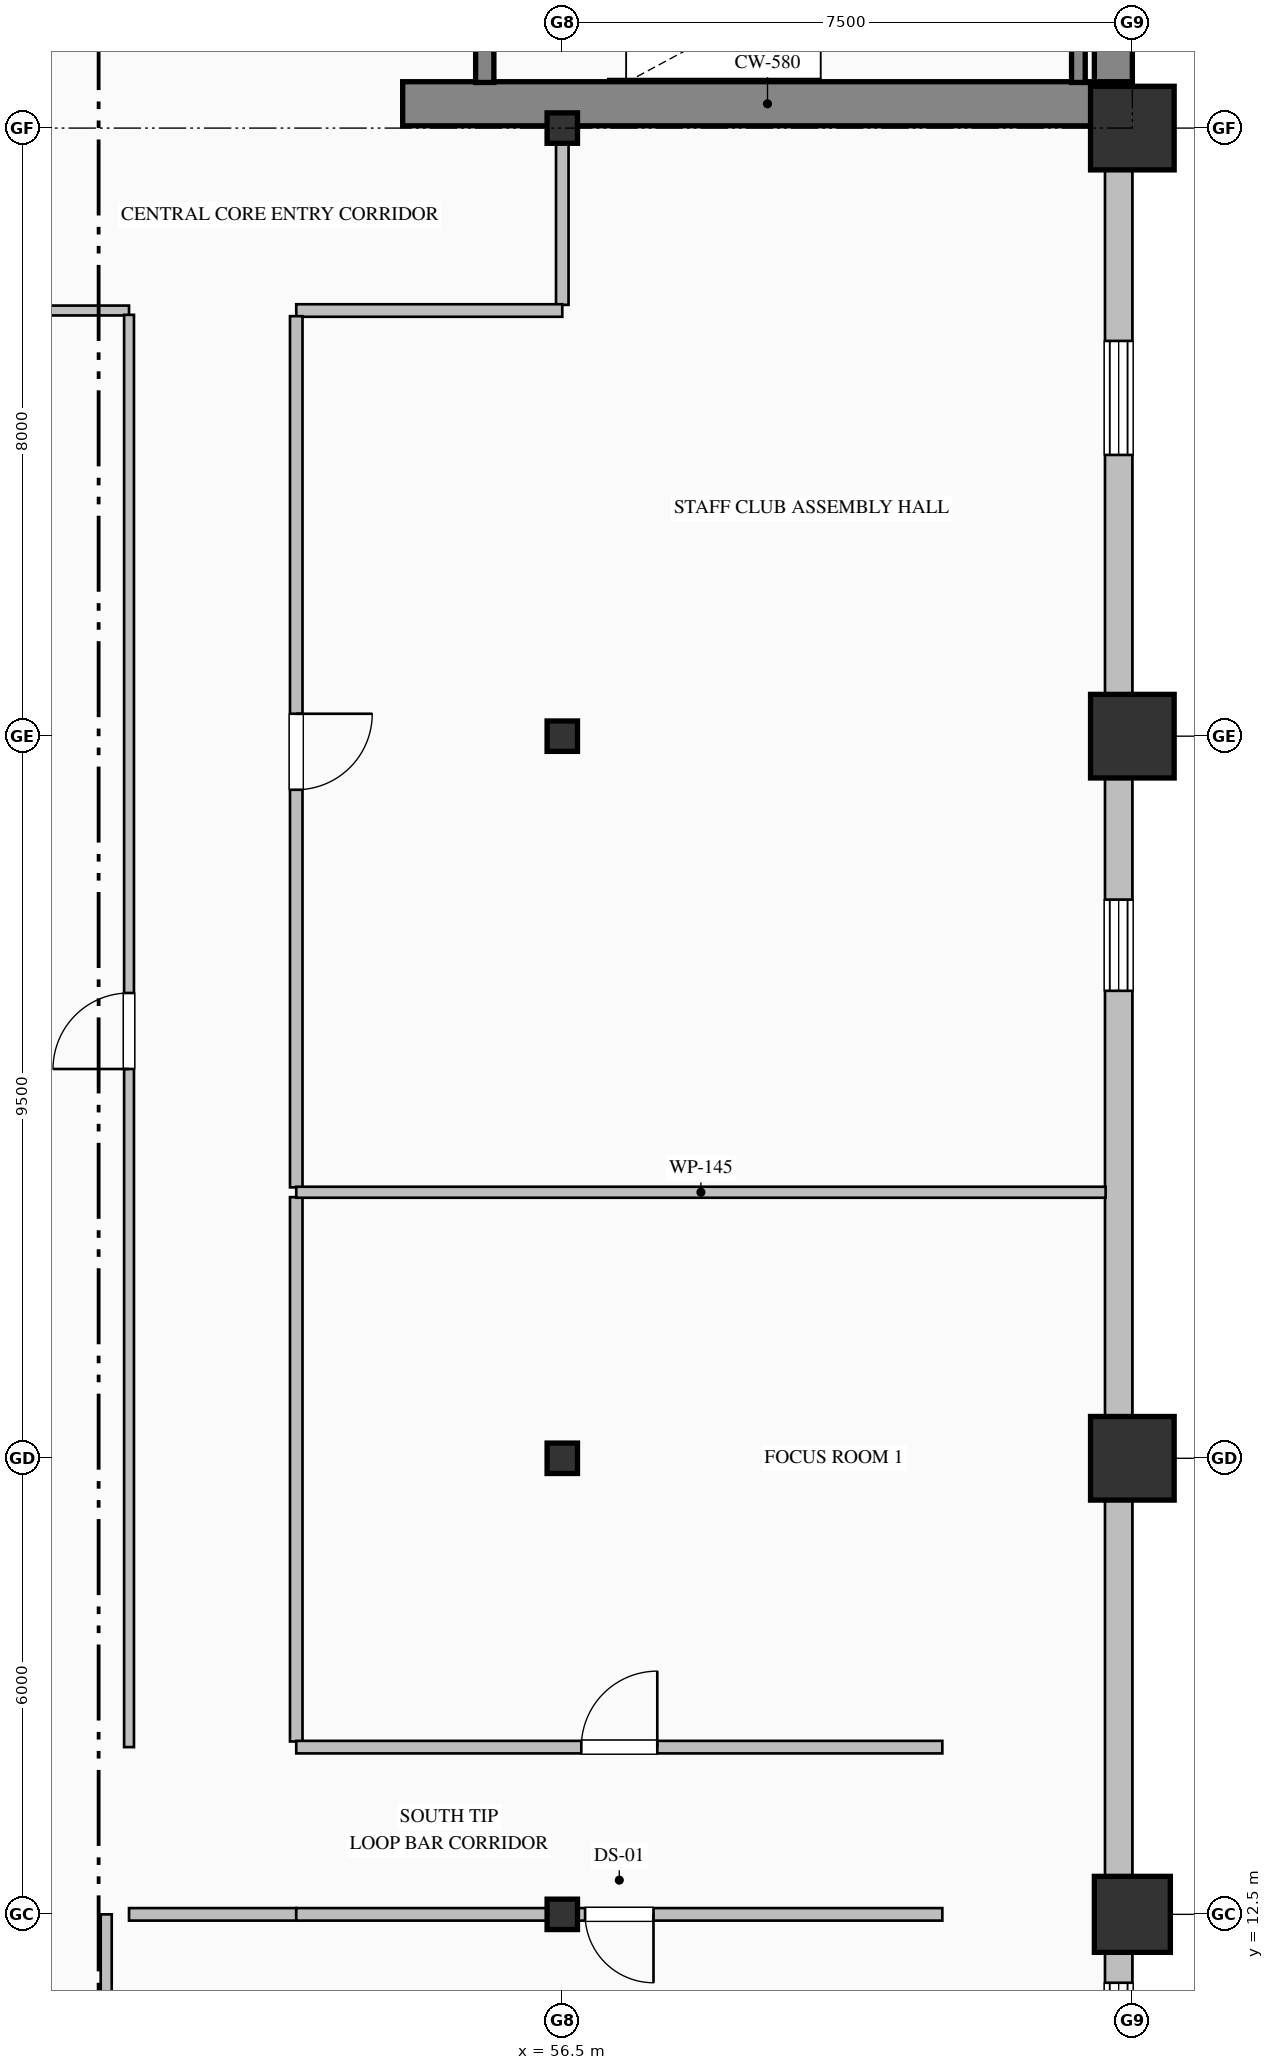
"""IFC4 building model, lengths in metres.
Left out: names, types, materials, properties, quantities, classifications, styles, units other than length and angle.
Written with IfcOpenShell. Run it as: python <this file> out.ifc"""

import sys

from ifc_helpers import new_model, si_unit, direction, frame, frame_2d, origin, origin_2d, place, context, subcontext, project, spatial, rectangle, hollow_rectangle, hollow_circle, i_section, extrude, element, fill, save


model = new_model("IFC4")
c1 = context("Model", 3, precision=1e-05, world=origin(), true_north=direction((0.0, 1.0)))
c2 = subcontext(c1, "Body", "Model", "MODEL_VIEW")
j1 = project(units=[si_unit("LENGTHUNIT", "METRE"), si_unit("PLANEANGLEUNIT", "RADIAN")], contexts=[c1])
p1 = place(None, origin())
s1 = spatial("IfcSite", under=j1, at=p1, CompositionType="ELEMENT")
p2 = place(p1, origin())
s2 = spatial("IfcBuilding", under=s1, at=p2, CompositionType="ELEMENT")
p3 = place(p2, frame((0.0, 0.0, 151.0)))
s3 = spatial("IfcBuildingStorey", under=s2, at=p3, CompositionType="ELEMENT", Elevation=151.0)
p4 = place(p3, frame((63.75, 36.32, 0.0), z_axis=(0.0, 0.0, 1.0), x_axis=(0.0, 1.0, 0.0)))
e1 = element("IfcWall", 1, at=p4, inside=s3, PredefinedType="SHEAR", context=c2, shape_type="SweptSolid", body=[
    extrude(rectangle(XDim=15.18, YDim=0.5, at=frame_2d((7.59, 0.0))), origin(), (0.0, 0.0, 1.0), 3.765),
])
p5 = place(p3, frame((54.4, 36.32, 0.0), z_axis=(0.0, 0.0, 1.0), x_axis=(1.0, 0.0, 0.0)))
e2 = element("IfcWall", 2, at=p5, inside=s3, PredefinedType="SHEAR", context=c2, shape_type="SweptSolid", body=[
    extrude(rectangle(XDim=9.6, YDim=0.58, at=frame_2d((4.8, 0.0))), origin(), (0.0, 0.0, 1.0), 4.0),
])
for number, where, z_axis, x_axis in (
    (3, (56.5, 12.5, 0.0), (0.0, 0.0, 1.0), (1.0, 0.0, 0.0)),
    (4, (56.5, 18.5, 0.0), (0.0, 0.0, 1.0), (1.0, 0.0, 0.0)),
    (5, (56.5, 28.0, 0.0), (0.0, 0.0, 1.0), (1.0, 0.0, 0.0)),
    (6, (56.5, 36.0, 0.0), (0.0, 0.0, 1.0), (1.0, 0.0, 0.0)),
):
    element("IfcColumn", number, at=place(p3, frame(where, z_axis=z_axis, x_axis=x_axis)), inside=s3, PredefinedType="COLUMN", context=c2, shape_type="SweptSolid", body=[
        extrude(i_section(OverallWidth=0.4, OverallDepth=0.4, WebThickness=0.013, FlangeThickness=0.021, FilletRadius=0.022, at=origin_2d()), origin(), (0.0, 0.0, 1.0), 4.0),
    ])
p6 = place(p3, frame((64.0, 12.5, 0.0), z_axis=(0.0, 0.0, 1.0), x_axis=(1.0, 0.0, 0.0)))
e7 = element("IfcColumn", 7, at=p6, inside=s3, PredefinedType="COLUMN", context=c2, shape_type="SweptSolid", body=[
    extrude(hollow_circle(Radius=0.5, WallThickness=0.036, at=origin_2d()), origin(), (0.0, 0.0, 1.0), 4.0),
])
for number, where, z_axis, x_axis in (
    (8, (64.0, 18.5, 0.0), (0.0, 0.0, 1.0), (1.0, 0.0, 0.0)),
    (9, (64.0, 28.0, 0.0), (0.0, 0.0, 1.0), (1.0, 0.0, 0.0)),
    (10, (64.0, 36.0, 0.0), (0.0, 0.0, 1.0), (1.0, 0.0, 0.0)),
):
    element("IfcColumn", number, at=place(p3, frame(where, z_axis=z_axis, x_axis=x_axis)), inside=s3, PredefinedType="COLUMN", context=c2, shape_type="SweptSolid", body=[
        extrude(hollow_rectangle(XDim=1.1, YDim=1.1, WallThickness=0.04, at=origin_2d()), origin(), (0.0, 0.0, 1.0), 4.0),
    ])
p7 = place(p3, frame((63.82, 36.05, 0.0), z_axis=(0.0, 0.0, 1.0), x_axis=(0.0, -1.0, 0.0)))
e11 = element("IfcWall", 11, at=p7, inside=s3, PredefinedType="SOLIDWALL", context=c2, shape_type="SweptSolid", body=[
    extrude(rectangle(XDim=28.05, YDim=0.36, at=frame_2d((14.025, 0.0))), origin(), (0.0, 0.0, 1.0), 3.265),
])
p8 = place(p7, frame((2.85, 0.0, 0.85)))
e12 = element("IfcOpeningElement", 12, at=p8, cuts=e11, PredefinedType="OPENING", context=c2, shape_type="SweptSolid", body=[
    extrude(rectangle(XDim=1.5, YDim=1.95, at=frame_2d((0.75, 0.975))), frame((0.0, 0.19, 0.0), z_axis=(0.0, -1.0, 0.0), x_axis=(1.0, 0.0, 0.0)), (0.0, 0.0, 1.0), 0.38),
])
p9 = place(p7, frame((10.2, 0.0, 0.7)))
e13 = element("IfcOpeningElement", 13, at=p9, cuts=e11, PredefinedType="OPENING", context=c2, shape_type="SweptSolid", body=[
    extrude(rectangle(XDim=1.2, YDim=1.85, at=frame_2d((0.6, 0.925))), frame((0.0, 0.19, 0.0), z_axis=(0.0, -1.0, 0.0), x_axis=(1.0, 0.0, 0.0)), (0.0, 0.0, 1.0), 0.38),
])
p10 = place(p7, frame((24.45, 0.0, 0.85)))
e14 = element("IfcOpeningElement", 14, at=p10, cuts=e11, PredefinedType="OPENING", context=c2, shape_type="SweptSolid", body=[
    extrude(rectangle(XDim=1.5, YDim=1.95, at=frame_2d((0.75, 0.975))), frame((0.0, 0.19, 0.0), z_axis=(0.0, -1.0, 0.0), x_axis=(1.0, 0.0, 0.0)), (0.0, 0.0, 1.0), 0.38),
])
p11 = place(p3, frame((55.48, 39.75, 0.0), z_axis=(0.0, 0.0, 1.0), x_axis=(0.0, -1.0, 0.0)))
e15 = element("IfcWall", 15, at=p11, inside=s3, PredefinedType="SOLIDWALL", context=c2, shape_type="SweptSolid", body=[
    extrude(rectangle(XDim=3.15, YDim=0.24, at=frame_2d((1.575, 0.0))), origin(), (0.0, 0.0, 1.0), 4.0),
])
p12 = place(p11, frame((1.0, 0.0, 0.0)))
e16 = element("IfcOpeningElement", 16, at=p12, cuts=e15, PredefinedType="OPENING", context=c2, shape_type="SweptSolid", body=[
    extrude(rectangle(XDim=1.15, YDim=2.2, at=frame_2d((0.575, 1.1))), frame((0.0, 0.13, 0.0), z_axis=(0.0, -1.0, 0.0), x_axis=(1.0, 0.0, 0.0)), (0.0, 0.0, 1.0), 0.26),
])
p13 = place(p3, frame((63.29, 36.6, 0.0), z_axis=(0.0, 0.0, 1.0), x_axis=(0.0, 1.0, 0.0)))
e17 = element("IfcWall", 17, at=p13, inside=s3, PredefinedType="SOLIDWALL", context=c2, shape_type="SweptSolid", body=[
    extrude(rectangle(XDim=3.15, YDim=0.18, at=frame_2d((1.575, 0.0))), origin(), (0.0, 0.0, 1.0), 4.0),
])
p14 = place(p3, frame((56.5, 36.0, 0.0), z_axis=(0.0, 0.0, 1.0), x_axis=(0.0, -1.0, 0.0)))
e18 = element("IfcWall", 18, at=p14, inside=s3, PredefinedType="PARTITIONING", context=c2, shape_type="SweptSolid", body=[
    extrude(rectangle(XDim=2.325, YDim=0.165, at=frame_2d((1.163, 0.0))), origin(), (0.0, 0.0, 1.0), 3.157),
])
p15 = place(p3, frame((56.5, 33.6, 0.0), z_axis=(0.0, 0.0, 1.0), x_axis=(-1.0, 0.0, 0.0)))
e19 = element("IfcWall", 19, at=p15, inside=s3, PredefinedType="PARTITIONING", context=c2, shape_type="SweptSolid", body=[
    extrude(rectangle(XDim=3.5, YDim=0.165, at=frame_2d((1.75, 0.0))), origin(), (0.0, 0.0, 1.0), 3.765),
])
p16 = place(p3, frame((50.8, 33.6, 0.0), z_axis=(0.0, 0.0, 1.0), x_axis=(-1.0, 0.0, 0.0)))
e20 = element("IfcWall", 20, at=p16, inside=s3, PredefinedType="PARTITIONING", context=c2, shape_type="SweptSolid", body=[
    extrude(rectangle(XDim=10.3, YDim=0.13, at=frame_2d((5.15, 0.0))), origin(), (0.0, 0.0, 1.0), 3.765),
])
p17 = place(p3, frame((53.0, 33.525, 0.0), z_axis=(0.0, 0.0, 1.0), x_axis=(0.0, -1.0, 0.0)))
e21 = element("IfcWall", 21, at=p17, inside=s3, PredefinedType="PARTITIONING", context=c2, shape_type="SweptSolid", body=[
    extrude(rectangle(XDim=11.461, YDim=0.165, at=frame_2d((5.73, 0.0))), origin(), (0.0, 0.0, 1.0), 3.765),
])
p18 = place(p17, frame((5.23, 0.0, 0.0)))
e22 = element("IfcOpeningElement", 22, at=p18, cuts=e21, PredefinedType="OPENING", context=c2, shape_type="SweptSolid", body=[
    extrude(rectangle(XDim=1.0, YDim=2.15, at=frame_2d((0.5, 1.075))), frame((0.0, 0.093, 0.0), z_axis=(0.0, -1.0, 0.0), x_axis=(1.0, 0.0, 0.0)), (0.0, 0.0, 1.0), 0.185),
])
p19 = place(p3, frame((53.0, 21.936, 0.0), z_axis=(0.0, 0.0, 1.0), x_axis=(0.0, -1.0, 0.0)))
e23 = element("IfcWall", 23, at=p19, inside=s3, PredefinedType="PARTITIONING", context=c2, shape_type="SweptSolid", body=[
    extrude(rectangle(XDim=7.161, YDim=0.165, at=frame_2d((3.581, 0.0))), origin(), (0.0, 0.0, 1.0), 3.765),
])
p20 = place(p3, frame((50.8, 14.7, 0.0), z_axis=(0.0, 0.0, 1.0), x_axis=(0.0, 1.0, 0.0)))
e24 = element("IfcWall", 24, at=p20, inside=s3, PredefinedType="PARTITIONING", context=c2, shape_type="SweptSolid", body=[
    extrude(rectangle(XDim=18.843, YDim=0.13, at=frame_2d((9.421, 0.0))), origin(), (0.0, 0.0, 1.0), 3.765),
])
p21 = place(p20, frame((8.921, 0.0, 0.0)))
e25 = element("IfcOpeningElement", 25, at=p21, cuts=e24, PredefinedType="OPENING", context=c2, shape_type="SweptSolid", body=[
    extrude(rectangle(XDim=1.0, YDim=2.15, at=frame_2d((0.5, 1.075))), frame((0.0, 0.075, 0.0), z_axis=(0.0, -1.0, 0.0), x_axis=(1.0, 0.0, 0.0)), (0.0, 0.0, 1.0), 0.15),
])
p22 = place(p3, frame((53.0, 12.5, 0.0), z_axis=(0.0, 0.0, 1.0), x_axis=(-1.0, 0.0, 0.0)))
e26 = element("IfcWall", 26, at=p22, inside=s3, PredefinedType="PARTITIONING", context=c2, shape_type="SweptSolid", body=[
    extrude(rectangle(XDim=2.2, YDim=0.165, at=frame_2d((1.1, 0.0))), origin(), (0.0, 0.0, 1.0), 3.157),
])
p23 = place(p3, frame((53.0, 14.7, 0.0), z_axis=(0.0, 0.0, 1.0), x_axis=(1.0, 0.0, 0.0)))
e27 = element("IfcWall", 27, at=p23, inside=s3, PredefinedType="PARTITIONING", context=c2, shape_type="SweptSolid", body=[
    extrude(rectangle(XDim=8.5, YDim=0.165, at=frame_2d((4.25, 0.0))), origin(), (0.0, 0.0, 1.0), 3.765),
])
p24 = place(p23, frame((3.75, 0.0, 0.0)))
e28 = element("IfcOpeningElement", 28, at=p24, cuts=e27, PredefinedType="OPENING", context=c2, shape_type="SweptSolid", body=[
    extrude(rectangle(XDim=1.0, YDim=2.15, at=frame_2d((0.5, 1.075))), frame((0.0, 0.093, 0.0), z_axis=(0.0, -1.0, 0.0), x_axis=(1.0, 0.0, 0.0)), (0.0, 0.0, 1.0), 0.185),
])
p25 = place(p3, frame((61.5, 12.5, 0.0), z_axis=(0.0, 0.0, 1.0), x_axis=(-1.0, 0.0, 0.0)))
e29 = element("IfcWall", 29, at=p25, inside=s3, PredefinedType="PARTITIONING", context=c2, shape_type="SweptSolid", body=[
    extrude(rectangle(XDim=8.5, YDim=0.165, at=frame_2d((4.25, 0.0))), origin(), (0.0, 0.0, 1.0), 3.157),
])
p26 = place(p25, frame((3.8, 0.0, 0.0)))
e30 = element("IfcOpeningElement", 30, at=p26, cuts=e29, PredefinedType="OPENING", context=c2, shape_type="SweptSolid", body=[
    extrude(rectangle(XDim=0.9, YDim=2.15, at=frame_2d((0.45, 1.075))), frame((0.0, 0.093, 0.0), z_axis=(0.0, -1.0, 0.0), x_axis=(1.0, 0.0, 0.0)), (0.0, 0.0, 1.0), 0.185),
])
p27 = place(p3, frame((63.648, 22.0, 0.0), z_axis=(0.0, 0.0, 1.0), x_axis=(-1.0, 0.0, 0.0)))
e31 = element("IfcWall", 31, at=p27, inside=s3, PredefinedType="PARTITIONING", context=c2, shape_type="SweptSolid", body=[
    extrude(rectangle(XDim=10.648, YDim=0.145, at=frame_2d((5.324, 0.0))), origin(), (0.0, 0.0, 1.0), 3.765),
])
p28 = place(p3, frame((50.5, 12.5, 0.0), z_axis=(0.0, 0.0, 1.0), x_axis=(0.0, -1.0, 0.0)))
e32 = element("IfcWall", 32, at=p28, inside=s3, PredefinedType="PARTITIONING", context=c2, shape_type="SweptSolid", body=[
    extrude(rectangle(XDim=8.148, YDim=0.145, at=frame_2d((4.074, 0.0))), origin(), (0.0, 0.0, 1.0), 3.765),
])
p29 = place(p28, frame((3.574, 0.0, 0.0)))
e33 = element("IfcOpeningElement", 33, at=p29, cuts=e32, PredefinedType="OPENING", context=c2, shape_type="SweptSolid", body=[
    extrude(rectangle(XDim=1.0, YDim=2.15, at=frame_2d((0.5, 1.075))), frame((0.0, 0.083, 0.0), z_axis=(0.0, -1.0, 0.0), x_axis=(1.0, 0.0, 0.0)), (0.0, 0.0, 1.0), 0.165),
])
p30 = place(p8, origin())
e34 = element("IfcWindow", 34, at=p30, inside=s3, PartitioningType="DOUBLE_PANEL_VERTICAL", PredefinedType="WINDOW", context=c2, shape_type="SweptSolid", body=[
    extrude(rectangle(XDim=1.5, YDim=1.95, at=frame_2d((0.75, 0.975))), frame((0.0, 0.15, 0.0), z_axis=(0.0, -1.0, 0.0), x_axis=(1.0, 0.0, 0.0)), (0.0, 0.0, 1.0), 0.06),
])
fill(e12, e34)
p31 = place(p9, origin())
e35 = element("IfcWindow", 35, at=p31, inside=s3, PartitioningType="DOUBLE_PANEL_VERTICAL", PredefinedType="WINDOW", context=c2, shape_type="SweptSolid", body=[
    extrude(rectangle(XDim=1.2, YDim=1.85, at=frame_2d((0.6, 0.925))), frame((0.0, 0.15, 0.0), z_axis=(0.0, -1.0, 0.0), x_axis=(1.0, 0.0, 0.0)), (0.0, 0.0, 1.0), 0.06),
])
fill(e13, e35)
p32 = place(p10, origin())
e36 = element("IfcWindow", 36, at=p32, inside=s3, PartitioningType="DOUBLE_PANEL_VERTICAL", PredefinedType="WINDOW", context=c2, shape_type="SweptSolid", body=[
    extrude(rectangle(XDim=1.5, YDim=1.95, at=frame_2d((0.75, 0.975))), frame((0.0, 0.15, 0.0), z_axis=(0.0, -1.0, 0.0), x_axis=(1.0, 0.0, 0.0)), (0.0, 0.0, 1.0), 0.06),
])
fill(e14, e36)
p33 = place(p18, origin())
e37 = element("IfcDoor", 37, at=p33, inside=s3, OperationType="SINGLE_SWING_LEFT", PredefinedType="DOOR", context=c2, shape_type="SweptSolid", body=[
    extrude(rectangle(XDim=1.0, YDim=2.15, at=frame_2d((0.5, 1.075))), frame((0.0, 0.025, 0.0), z_axis=(0.0, -1.0, 0.0), x_axis=(1.0, 0.0, 0.0)), (0.0, 0.0, 1.0), 0.05),
])
fill(e22, e37)
p34 = place(p24, origin())
e38 = element("IfcDoor", 38, at=p34, inside=s3, OperationType="SINGLE_SWING_RIGHT", PredefinedType="DOOR", context=c2, shape_type="SweptSolid", body=[
    extrude(rectangle(XDim=1.0, YDim=2.15, at=frame_2d((0.5, 1.075))), frame((0.0, 0.025, 0.0), z_axis=(0.0, -1.0, 0.0), x_axis=(1.0, 0.0, 0.0)), (0.0, 0.0, 1.0), 0.05),
])
fill(e28, e38)
p35 = place(p21, origin())
e39 = element("IfcDoor", 39, at=p35, inside=s3, OperationType="SINGLE_SWING_LEFT", PredefinedType="DOOR", context=c2, shape_type="SweptSolid", body=[
    extrude(rectangle(XDim=1.0, YDim=2.15, at=frame_2d((0.5, 1.075))), frame((0.0, 0.025, 0.0), z_axis=(0.0, -1.0, 0.0), x_axis=(1.0, 0.0, 0.0)), (0.0, 0.0, 1.0), 0.05),
])
fill(e25, e39)
p36 = place(p26, origin())
e40 = element("IfcDoor", 40, at=p36, inside=s3, OperationType="SINGLE_SWING_LEFT", PredefinedType="DOOR", context=c2, shape_type="SweptSolid", body=[
    extrude(rectangle(XDim=0.9, YDim=2.15, at=frame_2d((0.45, 1.075))), frame((0.0, 0.025, 0.0), z_axis=(0.0, -1.0, 0.0), x_axis=(1.0, 0.0, 0.0)), (0.0, 0.0, 1.0), 0.05),
])
fill(e30, e40)
save(model, sys.argv[1])
